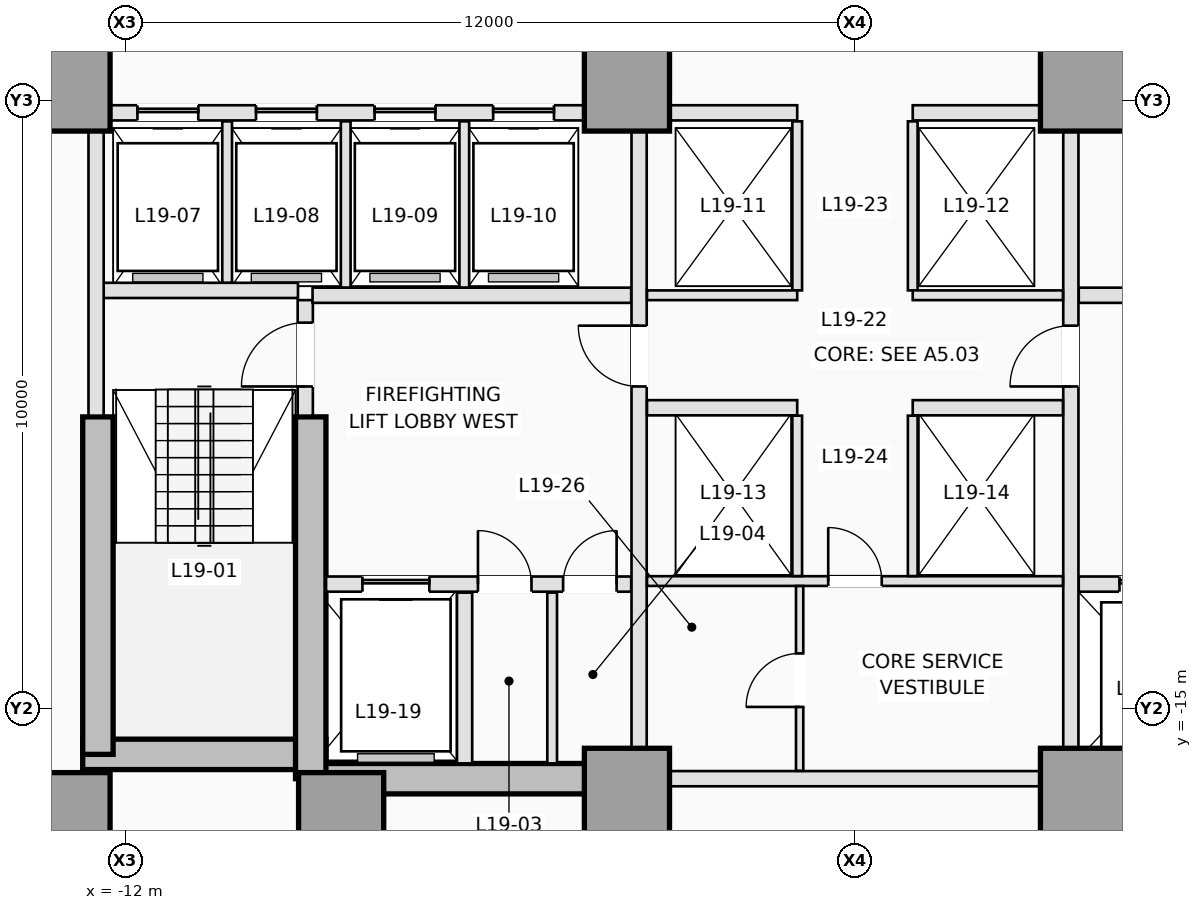
"""IFC4 building model, lengths in metres.
Left out: names, types, materials, properties, quantities, classifications, styles, units other than length and angle.
Written with IfcOpenShell. Run it as: python <this file> out.ifc"""

import sys

from ifc_helpers import new_model, si_unit, direction, frame, frame_2d, origin, origin_2d, place, context, subcontext, project, spatial, rectangle, extrude, element, fill, save


model = new_model("IFC4")
c1 = context("Model", 3, precision=1e-05, world=origin(), true_north=direction((0.0, 1.0)))
c2 = subcontext(c1, "Body", "Model", "MODEL_VIEW")
j1 = project(units=[si_unit("LENGTHUNIT", "METRE"), si_unit("PLANEANGLEUNIT", "RADIAN")], contexts=[c1])
p1 = place(None, origin())
s1 = spatial("IfcSite", under=j1, at=p1, CompositionType="ELEMENT")
p2 = place(p1, origin())
s2 = spatial("IfcBuilding", under=s1, at=p2, CompositionType="ELEMENT")
p3 = place(p2, frame((0.0, 0.0, 73.1)))
s3 = spatial("IfcBuildingStorey", under=s2, at=p3, CompositionType="ELEMENT", Elevation=73.1)
p4 = place(p3, frame((-12.7, -15.75, 0.0), z_axis=(0.0, 0.0, 1.0), x_axis=(1.0, 0.0, 0.0)))
e1 = element("IfcWall", 1, at=p4, inside=s3, PredefinedType="SHEAR", context=c2, shape_type="SweptSolid", body=[
    extrude(rectangle(XDim=4.0, YDim=0.5, at=frame_2d((2.0, 0.0))), origin(), (0.0, 0.0, 1.0), 3.5),
])
for number, where, z_axis, x_axis in (
    (2, (-8.95, -16.15, 0.0), (0.0, 0.0, 1.0), (1.0, 0.0, 0.0)),
    (3, (3.75, -16.15, 0.0), (0.0, 0.0, 1.0), (1.0, 0.0, 0.0)),
):
    element("IfcWall", number, at=place(p3, frame(where, z_axis=z_axis, x_axis=x_axis)), inside=s3, PredefinedType="SHEAR", context=c2, shape_type="SweptSolid", body=[
        extrude(rectangle(XDim=5.2, YDim=0.5, at=frame_2d((2.6, 0.0))), origin(), (0.0, 0.0, 1.0), 3.5),
    ])
p5 = place(p3, frame((-12.45, -15.75, 0.0), z_axis=(0.0, 0.0, 1.0), x_axis=(0.0, 1.0, 0.0)))
e4 = element("IfcWall", 4, at=p5, inside=s3, PredefinedType="SHEAR", context=c2, shape_type="SweptSolid", body=[
    extrude(rectangle(XDim=5.55, YDim=0.5, at=frame_2d((2.775, 0.0))), origin(), (0.0, 0.0, 1.0), 3.5),
])
p6 = place(p3, frame((-8.95, -16.15, 0.0), z_axis=(0.0, 0.0, 1.0), x_axis=(0.0, 1.0, 0.0)))
e5 = element("IfcWall", 5, at=p6, inside=s3, PredefinedType="SHEAR", context=c2, shape_type="SweptSolid", body=[
    extrude(rectangle(XDim=5.95, YDim=0.5, at=frame_2d((2.975, 0.0))), origin(), (0.0, 0.0, 1.0), 3.5),
])
for number, where, z_axis, x_axis in (
    (6, (-12.95, -16.75, 0.0), (0.0, 0.0, 1.0), (1.0, 0.0, 0.0)),
    (7, (-8.45, -16.75, 0.0), (0.0, 0.0, 1.0), (1.0, 0.0, 0.0)),
    (8, (-3.75, -16.35, 0.0), (0.0, 0.0, 1.0), (1.0, 0.0, 0.0)),
    (9, (3.75, -16.35, 0.0), (0.0, 0.0, 1.0), (1.0, 0.0, 0.0)),
    (10, (-12.95, -4.8, 0.0), (0.0, 0.0, 1.0), (1.0, 0.0, 0.0)),
    (11, (-3.75, -4.8, 0.0), (0.0, 0.0, 1.0), (1.0, 0.0, 0.0)),
    (12, (3.75, -4.8, 0.0), (0.0, 0.0, 1.0), (1.0, 0.0, 0.0)),
):
    element("IfcColumn", number, at=place(p3, frame(where, z_axis=z_axis, x_axis=x_axis)), inside=s3, PredefinedType="COLUMN", context=c2, shape_type="SweptSolid", body=[
        extrude(rectangle(XDim=1.4, YDim=1.4, at=origin_2d()), origin(), (0.0, 0.0, 1.0), 3.5),
    ])
p7 = place(p3, frame((-9.04, -10.18, 0.0), z_axis=(0.0, 0.0, 1.0), x_axis=(0.0, 1.0, 0.0)))
e13 = element("IfcWall", 13, at=p7, inside=s3, PredefinedType="PARTITIONING", context=c2, shape_type="SweptSolid", body=[
    extrude(rectangle(XDim=1.9, YDim=0.25, at=frame_2d((0.95, 0.0))), origin(), (0.0, 0.0, 1.0), 3.25),
])
p8 = place(p7, frame((0.48, 0.0, 0.0)))
e14 = element("IfcOpeningElement", 14, at=p8, cuts=e13, PredefinedType="OPENING", context=c2, shape_type="SweptSolid", body=[
    extrude(rectangle(XDim=1.05, YDim=2.15, at=frame_2d((0.525, 1.075))), frame((0.0, 0.135, 0.0), z_axis=(0.0, -1.0, 0.0), x_axis=(1.0, 0.0, 0.0)), (0.0, 0.0, 1.0), 0.27),
])
p9 = place(p3, frame((-12.38, -8.12, 0.0), z_axis=(0.0, 0.0, 1.0), x_axis=(1.0, 0.0, 0.0)))
e15 = element("IfcWall", 15, at=p9, inside=s3, PredefinedType="PARTITIONING", context=c2, shape_type="SweptSolid", body=[
    extrude(rectangle(XDim=3.22, YDim=0.25, at=frame_2d((1.61, 0.0))), origin(), (0.0, 0.0, 1.0), 3.25),
])
p10 = place(p3, frame((-12.48, -10.18, 0.0), z_axis=(0.0, 0.0, 1.0), x_axis=(0.0, 1.0, 0.0)))
e16 = element("IfcWall", 16, at=p10, inside=s3, PredefinedType="PARTITIONING", context=c2, shape_type="SweptSolid", body=[
    extrude(rectangle(XDim=4.678, YDim=0.25, at=frame_2d((2.339, 0.0))), origin(), (0.0, 0.0, 1.0), 3.25),
])
p11 = place(p3, frame((-8.698, -12.95, 0.0), z_axis=(0.0, 0.0, 1.0), x_axis=(1.0, 0.0, 0.0)))
e17 = element("IfcWall", 17, at=p11, inside=s3, PredefinedType="PARTITIONING", context=c2, shape_type="SweptSolid", body=[
    extrude(rectangle(XDim=5.018, YDim=0.25, at=frame_2d((2.509, 0.0))), origin(), (0.0, 0.0, 1.0), 3.25),
])
p12 = place(p11, frame((0.598, 0.0, 0.0)))
e18 = element("IfcOpeningElement", 18, at=p12, cuts=e17, PredefinedType="OPENING", context=c2, shape_type="SweptSolid", body=[
    extrude(rectangle(XDim=1.1, YDim=2.15, at=frame_2d((0.55, 1.075))), frame((0.0, 0.135, 0.0), z_axis=(0.0, -1.0, 0.0), x_axis=(1.0, 0.0, 0.0)), (0.0, 0.0, 1.0), 0.27),
])
p13 = place(p11, frame((2.498, 0.0, 0.0)))
e19 = element("IfcOpeningElement", 19, at=p13, cuts=e17, PredefinedType="OPENING", context=c2, shape_type="SweptSolid", body=[
    extrude(rectangle(XDim=0.88, YDim=2.1, at=frame_2d((0.44, 1.05))), frame((0.0, 0.135, 0.0), z_axis=(0.0, -1.0, 0.0), x_axis=(1.0, 0.0, 0.0)), (0.0, 0.0, 1.0), 0.27),
])
p14 = place(p11, frame((3.898, 0.0, 0.0)))
e20 = element("IfcOpeningElement", 20, at=p14, cuts=e17, PredefinedType="OPENING", context=c2, shape_type="SweptSolid", body=[
    extrude(rectangle(XDim=0.88, YDim=2.1, at=frame_2d((0.44, 1.05))), frame((0.0, 0.135, 0.0), z_axis=(0.0, -1.0, 0.0), x_axis=(1.0, 0.0, 0.0)), (0.0, 0.0, 1.0), 0.27),
])
p15 = place(p3, frame((3.68, -12.95, 0.0), z_axis=(0.0, 0.0, 1.0), x_axis=(1.0, 0.0, 0.0)))
e21 = element("IfcWall", 21, at=p15, inside=s3, PredefinedType="PARTITIONING", context=c2, shape_type="SweptSolid", body=[
    extrude(rectangle(XDim=5.018, YDim=0.25, at=frame_2d((2.509, 0.0))), origin(), (0.0, 0.0, 1.0), 3.25),
])
p16 = place(p15, frame((3.32, 0.0, 0.0)))
e22 = element("IfcOpeningElement", 22, at=p16, cuts=e21, PredefinedType="OPENING", context=c2, shape_type="SweptSolid", body=[
    extrude(rectangle(XDim=1.1, YDim=2.15, at=frame_2d((0.55, 1.075))), frame((0.0, 0.135, 0.0), z_axis=(0.0, -1.0, 0.0), x_axis=(1.0, 0.0, 0.0)), (0.0, 0.0, 1.0), 0.27),
])
p17 = place(p15, frame((0.67, 0.0, 0.0)))
e23 = element("IfcOpeningElement", 23, at=p17, cuts=e21, PredefinedType="OPENING", context=c2, shape_type="SweptSolid", body=[
    extrude(rectangle(XDim=1.2, YDim=2.15, at=frame_2d((0.6, 1.075))), frame((0.0, 0.135, 0.0), z_axis=(0.0, -1.0, 0.0), x_axis=(1.0, 0.0, 0.0)), (0.0, 0.0, 1.0), 0.27),
])
p18 = place(p3, frame((-6.42, -15.898, 0.0), z_axis=(0.0, 0.0, 1.0), x_axis=(0.0, 1.0, 0.0)))
e24 = element("IfcWall", 24, at=p18, inside=s3, PredefinedType="PARTITIONING", context=c2, shape_type="SweptSolid", body=[
    extrude(rectangle(XDim=2.808, YDim=0.25, at=frame_2d((1.404, 0.0))), origin(), (0.0, 0.0, 1.0), 3.25),
])
p19 = place(p3, frame((-4.98, -15.898, 0.0), z_axis=(0.0, 0.0, 1.0), x_axis=(0.0, 1.0, 0.0)))
e25 = element("IfcWall", 25, at=p19, inside=s3, PredefinedType="PARTITIONING", context=c2, shape_type="SweptSolid", body=[
    extrude(rectangle(XDim=2.808, YDim=0.16, at=frame_2d((1.404, 0.0))), origin(), (0.0, 0.0, 1.0), 3.25),
])
for number, where, z_axis, x_axis in (
    (26, (-8.92, -8.2, 0.0), (0.0, 0.0, 1.0), (1.0, 0.0, 0.0)),
    (27, (3.68, -8.2, 0.0), (0.0, 0.0, 1.0), (1.0, 0.0, 0.0)),
):
    element("IfcWall", number, at=place(p3, frame(where, z_axis=z_axis, x_axis=x_axis)), inside=s3, PredefinedType="PARTITIONING", context=c2, shape_type="SweptSolid", body=[
        extrude(rectangle(XDim=5.24, YDim=0.25, at=frame_2d((2.62, 0.0))), origin(), (0.0, 0.0, 1.0), 3.25),
    ])
p20 = place(p3, frame((-3.55, -15.648, 0.0), z_axis=(0.0, 0.0, 1.0), x_axis=(0.0, 1.0, 0.0)))
e28 = element("IfcWall", 28, at=p20, inside=s3, PredefinedType="PARTITIONING", context=c2, shape_type="SweptSolid", body=[
    extrude(rectangle(XDim=10.146, YDim=0.25, at=frame_2d((5.073, 0.0))), origin(), (0.0, 0.0, 1.0), 3.25),
])
p21 = place(p20, frame((5.948, 0.0, 0.0)))
e29 = element("IfcOpeningElement", 29, at=p21, cuts=e28, PredefinedType="OPENING", context=c2, shape_type="SweptSolid", body=[
    extrude(rectangle(XDim=1.0, YDim=2.15, at=frame_2d((0.5, 1.075))), frame((0.0, 0.135, 0.0), z_axis=(0.0, -1.0, 0.0), x_axis=(1.0, 0.0, 0.0)), (0.0, 0.0, 1.0), 0.27),
])
p22 = place(p3, frame((3.55, -15.648, 0.0), z_axis=(0.0, 0.0, 1.0), x_axis=(0.0, 1.0, 0.0)))
e30 = element("IfcWall", 30, at=p22, inside=s3, PredefinedType="PARTITIONING", context=c2, shape_type="SweptSolid", body=[
    extrude(rectangle(XDim=10.146, YDim=0.25, at=frame_2d((5.073, 0.0))), origin(), (0.0, 0.0, 1.0), 3.25),
])
p23 = place(p22, frame((5.948, 0.0, 0.0)))
e31 = element("IfcOpeningElement", 31, at=p23, cuts=e30, PredefinedType="OPENING", context=c2, shape_type="SweptSolid", body=[
    extrude(rectangle(XDim=1.0, YDim=2.15, at=frame_2d((0.5, 1.075))), frame((0.0, 0.135, 0.0), z_axis=(0.0, -1.0, 0.0), x_axis=(1.0, 0.0, 0.0)), (0.0, 0.0, 1.0), 0.27),
])
p24 = place(p3, frame((-12.248, -5.2, 0.0), z_axis=(0.0, 0.0, 1.0), x_axis=(1.0, 0.0, 0.0)))
e32 = element("IfcWall", 32, at=p24, inside=s3, PredefinedType="PARTITIONING", context=c2, shape_type="SweptSolid", body=[
    extrude(rectangle(XDim=7.796, YDim=0.25, at=frame_2d((3.898, 0.0))), origin(), (0.0, 0.0, 1.0), 3.25),
])
p25 = place(p24, frame((0.448, 0.0, 0.0)))
e33 = element("IfcOpeningElement", 33, at=p25, cuts=e32, PredefinedType="OPENING", context=c2, shape_type="SweptSolid", body=[
    extrude(rectangle(XDim=1.0, YDim=2.15, at=frame_2d((0.5, 1.075))), frame((0.0, 0.135, 0.0), z_axis=(0.0, -1.0, 0.0), x_axis=(1.0, 0.0, 0.0)), (0.0, 0.0, 1.0), 0.27),
])
p26 = place(p24, frame((2.398, 0.0, 0.0)))
e34 = element("IfcOpeningElement", 34, at=p26, cuts=e32, PredefinedType="OPENING", context=c2, shape_type="SweptSolid", body=[
    extrude(rectangle(XDim=1.0, YDim=2.15, at=frame_2d((0.5, 1.075))), frame((0.0, 0.135, 0.0), z_axis=(0.0, -1.0, 0.0), x_axis=(1.0, 0.0, 0.0)), (0.0, 0.0, 1.0), 0.27),
])
p27 = place(p24, frame((4.348, 0.0, 0.0)))
e35 = element("IfcOpeningElement", 35, at=p27, cuts=e32, PredefinedType="OPENING", context=c2, shape_type="SweptSolid", body=[
    extrude(rectangle(XDim=1.0, YDim=2.15, at=frame_2d((0.5, 1.075))), frame((0.0, 0.135, 0.0), z_axis=(0.0, -1.0, 0.0), x_axis=(1.0, 0.0, 0.0)), (0.0, 0.0, 1.0), 0.27),
])
p28 = place(p24, frame((6.298, 0.0, 0.0)))
e36 = element("IfcOpeningElement", 36, at=p28, cuts=e32, PredefinedType="OPENING", context=c2, shape_type="SweptSolid", body=[
    extrude(rectangle(XDim=1.0, YDim=2.15, at=frame_2d((0.5, 1.075))), frame((0.0, 0.135, 0.0), z_axis=(0.0, -1.0, 0.0), x_axis=(1.0, 0.0, 0.0)), (0.0, 0.0, 1.0), 0.27),
])
for number, where, z_axis, x_axis in (
    (37, (-3.048, -5.2, 0.0), (0.0, 0.0, 1.0), (1.0, 0.0, 0.0)),
    (38, (0.95, -5.2, 0.0), (0.0, 0.0, 1.0), (1.0, 0.0, 0.0)),
):
    element("IfcWall", number, at=place(p3, frame(where, z_axis=z_axis, x_axis=x_axis)), inside=s3, PredefinedType="PARTITIONING", context=c2, shape_type="SweptSolid", body=[
        extrude(rectangle(XDim=2.098, YDim=0.25, at=frame_2d((1.049, 0.0))), origin(), (0.0, 0.0, 1.0), 3.25),
    ])
p29 = place(p3, frame((-10.325, -7.993, 0.0), z_axis=(0.0, 0.0, 1.0), x_axis=(0.0, 1.0, 0.0)))
e39 = element("IfcWall", 39, at=p29, inside=s3, PredefinedType="PARTITIONING", context=c2, shape_type="SweptSolid", body=[
    extrude(rectangle(XDim=2.653, YDim=0.16, at=frame_2d((1.326, 0.0))), origin(), (0.0, 0.0, 1.0), 3.25),
])
for number, where, z_axis, x_axis in (
    (40, (-8.375, -8.073, 0.0), (0.0, 0.0, 1.0), (0.0, 1.0, 0.0)),
    (41, (-6.425, -8.073, 0.0), (0.0, 0.0, 1.0), (0.0, 1.0, 0.0)),
):
    element("IfcWall", number, at=place(p3, frame(where, z_axis=z_axis, x_axis=x_axis)), inside=s3, PredefinedType="PARTITIONING", context=c2, shape_type="SweptSolid", body=[
        extrude(rectangle(XDim=2.733, YDim=0.16, at=frame_2d((1.366, 0.0))), origin(), (0.0, 0.0, 1.0), 3.25),
    ])
p30 = place(p3, frame((-3.048, -16.15, 0.0), z_axis=(0.0, 0.0, 1.0), x_axis=(1.0, 0.0, 0.0)))
e42 = element("IfcWall", 42, at=p30, inside=s3, PredefinedType="PARTITIONING", context=c2, shape_type="SweptSolid", body=[
    extrude(rectangle(XDim=6.096, YDim=0.25, at=frame_2d((3.048, 0.0))), origin(), (0.0, 0.0, 1.0), 2.3),
])
for number, where, z_axis, x_axis in (
    (43, (-0.95, -8.12, 0.0), (0.0, 0.0, 1.0), (0.0, 1.0, 0.0)),
    (44, (0.95, -8.12, 0.0), (0.0, 0.0, 1.0), (0.0, 1.0, 0.0)),
):
    element("IfcWall", number, at=place(p3, frame(where, z_axis=z_axis, x_axis=x_axis)), inside=s3, PredefinedType="PARTITIONING", context=c2, shape_type="SweptSolid", body=[
        extrude(rectangle(XDim=2.78, YDim=0.16, at=frame_2d((1.39, 0.0))), origin(), (0.0, 0.0, 1.0), 3.25),
    ])
for number, where, z_axis, x_axis in (
    (45, (-3.42, -8.2, 0.0), (0.0, 0.0, 1.0), (1.0, 0.0, 0.0)),
    (46, (0.95, -8.2, 0.0), (0.0, 0.0, 1.0), (1.0, 0.0, 0.0)),
):
    element("IfcWall", number, at=place(p3, frame(where, z_axis=z_axis, x_axis=x_axis)), inside=s3, PredefinedType="PARTITIONING", context=c2, shape_type="SweptSolid", body=[
        extrude(rectangle(XDim=2.47, YDim=0.16, at=frame_2d((1.235, 0.0))), origin(), (0.0, 0.0, 1.0), 3.25),
    ])
for number, where, z_axis, x_axis in (
    (47, (-3.42, -10.05, 0.0), (0.0, 0.0, 1.0), (1.0, 0.0, 0.0)),
    (48, (0.95, -10.05, 0.0), (0.0, 0.0, 1.0), (1.0, 0.0, 0.0)),
):
    element("IfcWall", number, at=place(p3, frame(where, z_axis=z_axis, x_axis=x_axis)), inside=s3, PredefinedType="PARTITIONING", context=c2, shape_type="SweptSolid", body=[
        extrude(rectangle(XDim=2.47, YDim=0.25, at=frame_2d((1.235, 0.0))), origin(), (0.0, 0.0, 1.0), 3.25),
    ])
p31 = place(p3, frame((-3.42, -12.9, 0.0), z_axis=(0.0, 0.0, 1.0), x_axis=(1.0, 0.0, 0.0)))
e49 = element("IfcWall", 49, at=p31, inside=s3, PredefinedType="PARTITIONING", context=c2, shape_type="SweptSolid", body=[
    extrude(rectangle(XDim=6.84, YDim=0.16, at=frame_2d((3.42, 0.0))), origin(), (0.0, 0.0, 1.0), 3.25),
])
p32 = place(p31, frame((2.98, 0.0, 0.0)))
e50 = element("IfcOpeningElement", 50, at=p32, cuts=e49, PredefinedType="OPENING", context=c2, shape_type="SweptSolid", body=[
    extrude(rectangle(XDim=0.88, YDim=2.12, at=frame_2d((0.44, 1.06))), frame((0.0, 0.09, 0.0), z_axis=(0.0, -1.0, 0.0), x_axis=(1.0, 0.0, 0.0)), (0.0, 0.0, 1.0), 0.18),
])
for number, where, z_axis, x_axis in (
    (51, (-0.95, -12.818, 0.0), (0.0, 0.0, 1.0), (0.0, 1.0, 0.0)),
    (52, (0.95, -12.818, 0.0), (0.0, 0.0, 1.0), (0.0, 1.0, 0.0)),
):
    element("IfcWall", number, at=place(p3, frame(where, z_axis=z_axis, x_axis=x_axis)), inside=s3, PredefinedType="PARTITIONING", context=c2, shape_type="SweptSolid", body=[
        extrude(rectangle(XDim=2.638, YDim=0.16, at=frame_2d((1.319, 0.0))), origin(), (0.0, 0.0, 1.0), 3.25),
    ])
p33 = place(p3, frame((-0.91, -16.02, 0.0), z_axis=(0.0, 0.0, 1.0), x_axis=(0.0, 1.0, 0.0)))
e53 = element("IfcWall", 53, at=p33, inside=s3, PredefinedType="PARTITIONING", context=c2, shape_type="SweptSolid", body=[
    extrude(rectangle(XDim=3.038, YDim=0.12, at=frame_2d((1.519, 0.0))), origin(), (0.0, 0.0, 1.0), 3.25),
])
p34 = place(p33, frame((1.05, 0.0, 0.0)))
e54 = element("IfcOpeningElement", 54, at=p34, cuts=e53, PredefinedType="OPENING", context=c2, shape_type="SweptSolid", body=[
    extrude(rectangle(XDim=0.88, YDim=2.12, at=frame_2d((0.44, 1.06))), frame((0.0, 0.07, 0.0), z_axis=(0.0, -1.0, 0.0), x_axis=(1.0, 0.0, 0.0)), (0.0, 0.0, 1.0), 0.14),
])
p35 = place(p25, origin())
e55 = element("IfcDoor", 55, at=p35, inside=s3, OperationType="SLIDING_TO_LEFT", PredefinedType="DOOR", context=c2, shape_type="SweptSolid", body=[
    extrude(rectangle(XDim=1.0, YDim=2.15, at=frame_2d((0.5, 1.075))), frame((0.0, 0.025, 0.0), z_axis=(0.0, -1.0, 0.0), x_axis=(1.0, 0.0, 0.0)), (0.0, 0.0, 1.0), 0.05),
])
fill(e33, e55)
p36 = place(p26, origin())
e56 = element("IfcDoor", 56, at=p36, inside=s3, OperationType="SLIDING_TO_LEFT", PredefinedType="DOOR", context=c2, shape_type="SweptSolid", body=[
    extrude(rectangle(XDim=1.0, YDim=2.15, at=frame_2d((0.5, 1.075))), frame((0.0, 0.025, 0.0), z_axis=(0.0, -1.0, 0.0), x_axis=(1.0, 0.0, 0.0)), (0.0, 0.0, 1.0), 0.05),
])
fill(e34, e56)
p37 = place(p27, origin())
e57 = element("IfcDoor", 57, at=p37, inside=s3, OperationType="SLIDING_TO_LEFT", PredefinedType="DOOR", context=c2, shape_type="SweptSolid", body=[
    extrude(rectangle(XDim=1.0, YDim=2.15, at=frame_2d((0.5, 1.075))), frame((0.0, 0.025, 0.0), z_axis=(0.0, -1.0, 0.0), x_axis=(1.0, 0.0, 0.0)), (0.0, 0.0, 1.0), 0.05),
])
fill(e35, e57)
p38 = place(p28, origin())
e58 = element("IfcDoor", 58, at=p38, inside=s3, OperationType="SLIDING_TO_LEFT", PredefinedType="DOOR", context=c2, shape_type="SweptSolid", body=[
    extrude(rectangle(XDim=1.0, YDim=2.15, at=frame_2d((0.5, 1.075))), frame((0.0, 0.025, 0.0), z_axis=(0.0, -1.0, 0.0), x_axis=(1.0, 0.0, 0.0)), (0.0, 0.0, 1.0), 0.05),
])
fill(e36, e58)
p39 = place(p12, origin())
e59 = element("IfcDoor", 59, at=p39, inside=s3, OperationType="SLIDING_TO_LEFT", PredefinedType="DOOR", context=c2, shape_type="SweptSolid", body=[
    extrude(rectangle(XDim=1.1, YDim=2.15, at=frame_2d((0.55, 1.075))), frame((0.0, 0.025, 0.0), z_axis=(0.0, -1.0, 0.0), x_axis=(1.0, 0.0, 0.0)), (0.0, 0.0, 1.0), 0.05),
])
fill(e18, e59)
p40 = place(p17, origin())
e60 = element("IfcDoor", 60, at=p40, inside=s3, OperationType="SLIDING_TO_LEFT", PredefinedType="DOOR", context=c2, shape_type="SweptSolid", body=[
    extrude(rectangle(XDim=1.2, YDim=2.15, at=frame_2d((0.6, 1.075))), frame((0.0, 0.025, 0.0), z_axis=(0.0, -1.0, 0.0), x_axis=(1.0, 0.0, 0.0)), (0.0, 0.0, 1.0), 0.05),
])
fill(e23, e60)
p41 = place(p8, origin())
e61 = element("IfcDoor", 61, at=p41, inside=s3, OperationType="SINGLE_SWING_LEFT", PredefinedType="DOOR", context=c2, shape_type="SweptSolid", body=[
    extrude(rectangle(XDim=1.05, YDim=2.15, at=frame_2d((0.525, 1.075))), frame((0.0, 0.025, 0.0), z_axis=(0.0, -1.0, 0.0), x_axis=(1.0, 0.0, 0.0)), (0.0, 0.0, 1.0), 0.05),
])
fill(e14, e61)
p42 = place(p13, origin())
e62 = element("IfcDoor", 62, at=p42, inside=s3, OperationType="SINGLE_SWING_LEFT", PredefinedType="TRAPDOOR", context=c2, shape_type="SweptSolid", body=[
    extrude(rectangle(XDim=0.88, YDim=2.1, at=frame_2d((0.44, 1.05))), frame((0.0, 0.025, 0.0), z_axis=(0.0, -1.0, 0.0), x_axis=(1.0, 0.0, 0.0)), (0.0, 0.0, 1.0), 0.05),
])
fill(e19, e62)
p43 = place(p14, origin())
e63 = element("IfcDoor", 63, at=p43, inside=s3, OperationType="SINGLE_SWING_RIGHT", PredefinedType="TRAPDOOR", context=c2, shape_type="SweptSolid", body=[
    extrude(rectangle(XDim=0.88, YDim=2.1, at=frame_2d((0.44, 1.05))), frame((0.0, 0.025, 0.0), z_axis=(0.0, -1.0, 0.0), x_axis=(1.0, 0.0, 0.0)), (0.0, 0.0, 1.0), 0.05),
])
fill(e20, e63)
p44 = place(p21, origin())
e64 = element("IfcDoor", 64, at=p44, inside=s3, OperationType="SINGLE_SWING_RIGHT", PredefinedType="DOOR", context=c2, shape_type="SweptSolid", body=[
    extrude(rectangle(XDim=1.0, YDim=2.15, at=frame_2d((0.5, 1.075))), frame((0.0, 0.025, 0.0), z_axis=(0.0, -1.0, 0.0), x_axis=(1.0, 0.0, 0.0)), (0.0, 0.0, 1.0), 0.05),
])
fill(e29, e64)
p45 = place(p23, origin())
e65 = element("IfcDoor", 65, at=p45, inside=s3, OperationType="SINGLE_SWING_LEFT", PredefinedType="DOOR", context=c2, shape_type="SweptSolid", body=[
    extrude(rectangle(XDim=1.0, YDim=2.15, at=frame_2d((0.5, 1.075))), frame((0.0, 0.025, 0.0), z_axis=(0.0, -1.0, 0.0), x_axis=(1.0, 0.0, 0.0)), (0.0, 0.0, 1.0), 0.05),
])
fill(e31, e65)
p46 = place(p32, origin())
e66 = element("IfcDoor", 66, at=p46, inside=s3, OperationType="SINGLE_SWING_LEFT", PredefinedType="DOOR", context=c2, shape_type="SweptSolid", body=[
    extrude(rectangle(XDim=0.88, YDim=2.12, at=frame_2d((0.44, 1.06))), frame((0.0, 0.025, 0.0), z_axis=(0.0, -1.0, 0.0), x_axis=(1.0, 0.0, 0.0)), (0.0, 0.0, 1.0), 0.05),
])
fill(e50, e66)
p47 = place(p34, origin())
e67 = element("IfcDoor", 67, at=p47, inside=s3, OperationType="SINGLE_SWING_LEFT", PredefinedType="DOOR", context=c2, shape_type="SweptSolid", body=[
    extrude(rectangle(XDim=0.88, YDim=2.12, at=frame_2d((0.44, 1.06))), frame((0.0, 0.025, 0.0), z_axis=(0.0, -1.0, 0.0), x_axis=(1.0, 0.0, 0.0)), (0.0, 0.0, 1.0), 0.05),
])
fill(e54, e67)
save(model, sys.argv[1])
